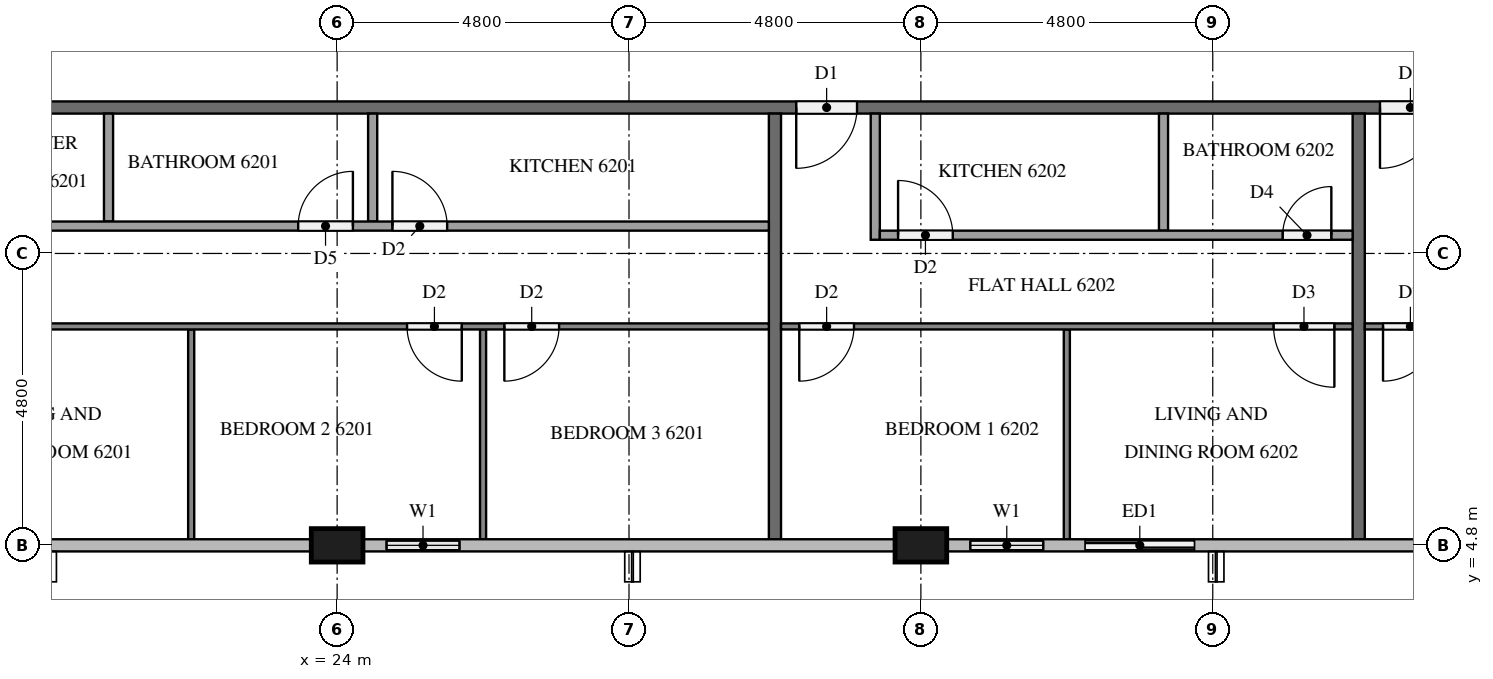
"""IFC4 building model, lengths in metres.
Left out: names, types, materials, properties, quantities, classifications, styles, units other than length and angle.
Written with IfcOpenShell. Run it as: python <this file> out.ifc"""

import sys

from ifc_helpers import new_model, si_unit, direction, frame, frame_2d, origin, origin_2d, place, context, subcontext, project, spatial, rectangle, extrude, element, fill, save


model = new_model("IFC4")
c1 = context("Model", 3, precision=1e-05, world=origin(), true_north=direction((0.0, 1.0)))
c2 = subcontext(c1, "Body", "Model", "MODEL_VIEW")
j1 = project(units=[si_unit("LENGTHUNIT", "METRE"), si_unit("PLANEANGLEUNIT", "RADIAN")], contexts=[c1])
p1 = place(None, origin())
s1 = spatial("IfcSite", under=j1, at=p1, CompositionType="ELEMENT")
p2 = place(p1, origin())
s2 = spatial("IfcBuilding", under=s1, at=p2, CompositionType="ELEMENT")
p3 = place(p2, frame((0.0, 0.0, 238.7)))
s3 = spatial("IfcBuildingStorey", under=s2, at=p3, CompositionType="ELEMENT", Elevation=238.7)
for number, where, z_axis, x_axis in (
    (1, (24.0, 4.8, 0.0), (0.0, 0.0, 1.0), (1.0, 0.0, 0.0)),
    (2, (33.6, 4.8, 0.0), (0.0, 0.0, 1.0), (1.0, 0.0, 0.0)),
):
    element("IfcColumn", number, at=place(p3, frame(where, z_axis=z_axis, x_axis=x_axis)), inside=s3, PredefinedType="COLUMN", context=c2, shape_type="SweptSolid", body=[
        extrude(rectangle(XDim=0.85, YDim=0.55, at=origin_2d()), origin(), (0.0, 0.0, 1.0), 3.2),
    ])
p4 = place(p3, frame((24.425, 4.8, 0.0), z_axis=(0.0, 0.0, 1.0), x_axis=(1.0, 0.0, 0.0)))
e3 = element("IfcWall", 3, at=p4, inside=s3, PredefinedType="SOLIDWALL", context=c2, shape_type="SweptSolid", body=[
    extrude(rectangle(XDim=1.975, YDim=0.15, at=frame_2d((0.987, 0.0))), origin(), (0.0, 0.0, 1.0), 3.2),
])
p5 = place(p4, frame((0.387, 0.0, 0.9)))
e4 = element("IfcOpeningElement", 4, at=p5, cuts=e3, PredefinedType="OPENING", context=c2, shape_type="SweptSolid", body=[
    extrude(rectangle(XDim=1.2, YDim=1.4, at=frame_2d((0.6, 0.7))), frame((0.0, 0.085, 0.0), z_axis=(0.0, -1.0, 0.0), x_axis=(1.0, 0.0, 0.0)), (0.0, 0.0, 1.0), 0.17),
])
p6 = place(p3, frame((34.025, 4.8, 0.0), z_axis=(0.0, 0.0, 1.0), x_axis=(1.0, 0.0, 0.0)))
e5 = element("IfcWall", 5, at=p6, inside=s3, PredefinedType="SOLIDWALL", context=c2, shape_type="SweptSolid", body=[
    extrude(rectangle(XDim=4.375, YDim=0.15, at=frame_2d((2.188, 0.0))), origin(), (0.0, 0.0, 1.0), 3.2),
])
p7 = place(p6, frame((0.387, 0.0, 0.9)))
e6 = element("IfcOpeningElement", 6, at=p7, cuts=e5, PredefinedType="OPENING", context=c2, shape_type="SweptSolid", body=[
    extrude(rectangle(XDim=1.2, YDim=1.4, at=frame_2d((0.6, 0.7))), frame((0.0, 0.085, 0.0), z_axis=(0.0, -1.0, 0.0), x_axis=(1.0, 0.0, 0.0)), (0.0, 0.0, 1.0), 0.17),
])
p8 = place(p6, frame((2.275, 0.0, 0.0)))
e7 = element("IfcOpeningElement", 7, at=p8, cuts=e5, PredefinedType="OPENING", context=c2, shape_type="SweptSolid", body=[
    extrude(rectangle(XDim=1.8, YDim=2.4, at=frame_2d((0.9, 1.2))), frame((0.0, 0.085, 0.0), z_axis=(0.0, -1.0, 0.0), x_axis=(1.0, 0.0, 0.0)), (0.0, 0.0, 1.0), 0.17),
])
p9 = place(p3, frame((50.5, 12.0, 0.0), z_axis=(0.0, 0.0, 1.0), x_axis=(-1.0, 0.0, 0.0)))
e8 = element("IfcWall", 8, at=p9, inside=s3, PredefinedType="PARTITIONING", context=c2, shape_type="SweptSolid", body=[
    extrude(rectangle(XDim=38.6, YDim=0.2, at=frame_2d((19.3, 0.0))), origin(), (0.0, 0.0, 1.0), 3.2),
])
p10 = place(p9, frame((37.1, 0.0, 0.0)))
e9 = element("IfcOpeningElement", 9, at=p10, cuts=e8, PredefinedType="OPENING", context=c2, shape_type="SweptSolid", body=[
    extrude(rectangle(XDim=1.1, YDim=2.1, at=frame_2d((0.55, 1.05))), frame((0.0, 0.11, 0.0), z_axis=(0.0, -1.0, 0.0), x_axis=(1.0, 0.0, 0.0)), (0.0, 0.0, 1.0), 0.22),
])
p11 = place(p9, frame((17.95, 0.0, 0.0)))
e10 = element("IfcOpeningElement", 10, at=p11, cuts=e8, PredefinedType="OPENING", context=c2, shape_type="SweptSolid", body=[
    extrude(rectangle(XDim=1.0, YDim=2.1, at=frame_2d((0.5, 1.05))), frame((0.0, 0.11, 0.0), z_axis=(0.0, -1.0, 0.0), x_axis=(1.0, 0.0, 0.0)), (0.0, 0.0, 1.0), 0.22),
])
p12 = place(p9, frame((8.35, 0.0, 0.0)))
e11 = element("IfcOpeningElement", 11, at=p12, cuts=e8, PredefinedType="OPENING", context=c2, shape_type="SweptSolid", body=[
    extrude(rectangle(XDim=1.0, YDim=2.1, at=frame_2d((0.5, 1.05))), frame((0.0, 0.11, 0.0), z_axis=(0.0, -1.0, 0.0), x_axis=(1.0, 0.0, 0.0)), (0.0, 0.0, 1.0), 0.22),
])
for number, where, z_axis, x_axis in (
    (12, (31.2, 11.9, 0.0), (0.0, 0.0, 1.0), (0.0, -1.0, 0.0)),
    (13, (40.8, 11.9, 0.0), (0.0, 0.0, 1.0), (0.0, -1.0, 0.0)),
):
    element("IfcWall", number, at=place(p3, frame(where, z_axis=z_axis, x_axis=x_axis)), inside=s3, PredefinedType="PARTITIONING", context=c2, shape_type="SweptSolid", body=[
        extrude(rectangle(XDim=7.0, YDim=0.2, at=frame_2d((3.5, 0.0))), origin(), (0.0, 0.0, 1.0), 3.2),
    ])
for number, where, z_axis, x_axis in (
    (14, (21.6, 8.35, 0.0), (0.0, 0.0, 1.0), (0.0, -1.0, 0.0)),
    (15, (26.4, 8.35, 0.0), (0.0, 0.0, 1.0), (0.0, -1.0, 0.0)),
):
    element("IfcWall", number, at=place(p3, frame(where, z_axis=z_axis, x_axis=x_axis)), inside=s3, PredefinedType="PARTITIONING", context=c2, shape_type="SweptSolid", body=[
        extrude(rectangle(XDim=3.45, YDim=0.1, at=frame_2d((1.725, 0.0))), origin(), (0.0, 0.0, 1.0), 3.2),
    ])
p13 = place(p3, frame((31.1, 8.4, 0.0), z_axis=(0.0, 0.0, 1.0), x_axis=(-1.0, 0.0, 0.0)))
e16 = element("IfcWall", 16, at=p13, inside=s3, PredefinedType="PARTITIONING", context=c2, shape_type="SweptSolid", body=[
    extrude(rectangle(XDim=19.0, YDim=0.1, at=frame_2d((9.5, 0.0))), origin(), (0.0, 0.0, 1.0), 3.2),
])
p14 = place(p13, frame((14.65, 0.0, 0.0)))
e17 = element("IfcOpeningElement", 17, at=p14, cuts=e16, PredefinedType="OPENING", context=c2, shape_type="SweptSolid", body=[
    extrude(rectangle(XDim=0.9, YDim=2.1, at=frame_2d((0.45, 1.05))), frame((0.0, 0.06, 0.0), z_axis=(0.0, -1.0, 0.0), x_axis=(1.0, 0.0, 0.0)), (0.0, 0.0, 1.0), 0.12),
])
p15 = place(p13, frame((12.95, 0.0, 0.0)))
e18 = element("IfcOpeningElement", 18, at=p15, cuts=e16, PredefinedType="OPENING", context=c2, shape_type="SweptSolid", body=[
    extrude(rectangle(XDim=1.0, YDim=2.1, at=frame_2d((0.5, 1.05))), frame((0.0, 0.06, 0.0), z_axis=(0.0, -1.0, 0.0), x_axis=(1.0, 0.0, 0.0)), (0.0, 0.0, 1.0), 0.12),
])
p16 = place(p13, frame((5.05, 0.0, 0.0)))
e19 = element("IfcOpeningElement", 19, at=p16, cuts=e16, PredefinedType="OPENING", context=c2, shape_type="SweptSolid", body=[
    extrude(rectangle(XDim=0.9, YDim=2.1, at=frame_2d((0.45, 1.05))), frame((0.0, 0.06, 0.0), z_axis=(0.0, -1.0, 0.0), x_axis=(1.0, 0.0, 0.0)), (0.0, 0.0, 1.0), 0.12),
])
p17 = place(p13, frame((3.45, 0.0, 0.0)))
e20 = element("IfcOpeningElement", 20, at=p17, cuts=e16, PredefinedType="OPENING", context=c2, shape_type="SweptSolid", body=[
    extrude(rectangle(XDim=0.9, YDim=2.1, at=frame_2d((0.45, 1.05))), frame((0.0, 0.06, 0.0), z_axis=(0.0, -1.0, 0.0), x_axis=(1.0, 0.0, 0.0)), (0.0, 0.0, 1.0), 0.12),
])
for number, where, z_axis, x_axis in (
    (21, (20.24, 11.9, 0.0), (0.0, 0.0, 1.0), (0.0, -1.0, 0.0)),
    (22, (24.584, 11.9, 0.0), (0.0, 0.0, 1.0), (0.0, -1.0, 0.0)),
):
    element("IfcWall", number, at=place(p3, frame(where, z_axis=z_axis, x_axis=x_axis)), inside=s3, PredefinedType="PARTITIONING", context=c2, shape_type="SweptSolid", body=[
        extrude(rectangle(XDim=1.775, YDim=0.15, at=frame_2d((0.887, 0.0))), origin(), (0.0, 0.0, 1.0), 3.2),
    ])
p18 = place(p3, frame((13.725, 10.05, 0.0), z_axis=(0.0, 0.0, 1.0), x_axis=(1.0, 0.0, 0.0)))
e23 = element("IfcWall", 23, at=p18, inside=s3, PredefinedType="PARTITIONING", context=c2, shape_type="SweptSolid", body=[
    extrude(rectangle(XDim=17.375, YDim=0.15, at=frame_2d((8.688, 0.0))), origin(), (0.0, 0.0, 1.0), 3.2),
])
p19 = place(p18, frame((2.133, 0.0, 0.0)))
e24 = element("IfcOpeningElement", 24, at=p19, cuts=e23, PredefinedType="OPENING", context=c2, shape_type="SweptSolid", body=[
    extrude(rectangle(XDim=0.8, YDim=2.1, at=frame_2d((0.4, 1.05))), frame((0.0, 0.085, 0.0), z_axis=(0.0, -1.0, 0.0), x_axis=(1.0, 0.0, 0.0)), (0.0, 0.0, 1.0), 0.17),
])
p20 = place(p18, frame((3.583, 0.0, 0.0)))
e25 = element("IfcOpeningElement", 25, at=p20, cuts=e23, PredefinedType="OPENING", context=c2, shape_type="SweptSolid", body=[
    extrude(rectangle(XDim=0.8, YDim=2.1, at=frame_2d((0.4, 1.05))), frame((0.0, 0.085, 0.0), z_axis=(0.0, -1.0, 0.0), x_axis=(1.0, 0.0, 0.0)), (0.0, 0.0, 1.0), 0.17),
])
p21 = place(p18, frame((9.635, 0.0, 0.0)))
e26 = element("IfcOpeningElement", 26, at=p21, cuts=e23, PredefinedType="OPENING", context=c2, shape_type="SweptSolid", body=[
    extrude(rectangle(XDim=0.9, YDim=2.1, at=frame_2d((0.45, 1.05))), frame((0.0, 0.085, 0.0), z_axis=(0.0, -1.0, 0.0), x_axis=(1.0, 0.0, 0.0)), (0.0, 0.0, 1.0), 0.17),
])
p22 = place(p18, frame((11.184, 0.0, 0.0)))
e27 = element("IfcOpeningElement", 27, at=p22, cuts=e23, PredefinedType="OPENING", context=c2, shape_type="SweptSolid", body=[
    extrude(rectangle(XDim=0.9, YDim=2.1, at=frame_2d((0.45, 1.05))), frame((0.0, 0.085, 0.0), z_axis=(0.0, -1.0, 0.0), x_axis=(1.0, 0.0, 0.0)), (0.0, 0.0, 1.0), 0.17),
])
p23 = place(p3, frame((36.0, 8.35, 0.0), z_axis=(0.0, 0.0, 1.0), x_axis=(0.0, -1.0, 0.0)))
e28 = element("IfcWall", 28, at=p23, inside=s3, PredefinedType="PARTITIONING", context=c2, shape_type="SweptSolid", body=[
    extrude(rectangle(XDim=3.45, YDim=0.1, at=frame_2d((1.725, 0.0))), origin(), (0.0, 0.0, 1.0), 3.2),
])
p24 = place(p3, frame((40.7, 8.4, 0.0), z_axis=(0.0, 0.0, 1.0), x_axis=(-1.0, 0.0, 0.0)))
e29 = element("IfcWall", 29, at=p24, inside=s3, PredefinedType="PARTITIONING", context=c2, shape_type="SweptSolid", body=[
    extrude(rectangle(XDim=9.4, YDim=0.1, at=frame_2d((4.7, 0.0))), origin(), (0.0, 0.0, 1.0), 3.2),
])
p25 = place(p24, frame((8.2, 0.0, 0.0)))
e30 = element("IfcOpeningElement", 30, at=p25, cuts=e29, PredefinedType="OPENING", context=c2, shape_type="SweptSolid", body=[
    extrude(rectangle(XDim=0.9, YDim=2.1, at=frame_2d((0.45, 1.05))), frame((0.0, 0.06, 0.0), z_axis=(0.0, -1.0, 0.0), x_axis=(1.0, 0.0, 0.0)), (0.0, 0.0, 1.0), 0.12),
])
p26 = place(p24, frame((0.3, 0.0, 0.0)))
e31 = element("IfcOpeningElement", 31, at=p26, cuts=e29, PredefinedType="OPENING", context=c2, shape_type="SweptSolid", body=[
    extrude(rectangle(XDim=1.0, YDim=2.1, at=frame_2d((0.5, 1.05))), frame((0.0, 0.06, 0.0), z_axis=(0.0, -1.0, 0.0), x_axis=(1.0, 0.0, 0.0)), (0.0, 0.0, 1.0), 0.12),
])
p27 = place(p3, frame((37.59, 11.9, 0.0), z_axis=(0.0, 0.0, 1.0), x_axis=(0.0, -1.0, 0.0)))
e32 = element("IfcWall", 32, at=p27, inside=s3, PredefinedType="PARTITIONING", context=c2, shape_type="SweptSolid", body=[
    extrude(rectangle(XDim=1.925, YDim=0.15, at=frame_2d((0.962, 0.0))), origin(), (0.0, 0.0, 1.0), 3.2),
])
p28 = place(p3, frame((32.85, 11.9, 0.0), z_axis=(0.0, 0.0, 1.0), x_axis=(0.0, -1.0, 0.0)))
e33 = element("IfcWall", 33, at=p28, inside=s3, PredefinedType="PARTITIONING", context=c2, shape_type="SweptSolid", body=[
    extrude(rectangle(XDim=2.075, YDim=0.15, at=frame_2d((1.038, 0.0))), origin(), (0.0, 0.0, 1.0), 3.2),
])
p29 = place(p3, frame((32.925, 9.9, 0.0), z_axis=(0.0, 0.0, 1.0), x_axis=(1.0, 0.0, 0.0)))
e34 = element("IfcWall", 34, at=p29, inside=s3, PredefinedType="PARTITIONING", context=c2, shape_type="SweptSolid", body=[
    extrude(rectangle(XDim=7.775, YDim=0.15, at=frame_2d((3.887, 0.0))), origin(), (0.0, 0.0, 1.0), 3.2),
])
p30 = place(p29, frame((0.3, 0.0, 0.0)))
e35 = element("IfcOpeningElement", 35, at=p30, cuts=e34, PredefinedType="OPENING", context=c2, shape_type="SweptSolid", body=[
    extrude(rectangle(XDim=0.9, YDim=2.1, at=frame_2d((0.45, 1.05))), frame((0.0, 0.085, 0.0), z_axis=(0.0, -1.0, 0.0), x_axis=(1.0, 0.0, 0.0)), (0.0, 0.0, 1.0), 0.17),
])
p31 = place(p29, frame((6.625, 0.0, 0.0)))
e36 = element("IfcOpeningElement", 36, at=p31, cuts=e34, PredefinedType="OPENING", context=c2, shape_type="SweptSolid", body=[
    extrude(rectangle(XDim=0.8, YDim=2.1, at=frame_2d((0.4, 1.05))), frame((0.0, 0.085, 0.0), z_axis=(0.0, -1.0, 0.0), x_axis=(1.0, 0.0, 0.0)), (0.0, 0.0, 1.0), 0.17),
])
p32 = place(p3, frame((57.178, 8.4, 0.0), z_axis=(0.0, 0.0, 1.0), x_axis=(-1.0, 0.0, 0.0)))
e37 = element("IfcWall", 37, at=p32, inside=s3, PredefinedType="PARTITIONING", context=c2, shape_type="SweptSolid", body=[
    extrude(rectangle(XDim=16.279, YDim=0.1, at=frame_2d((8.139, 0.0))), origin(), (0.0, 0.0, 1.0), 3.2),
])
p33 = place(p32, frame((15.079, 0.0, 0.0)))
e38 = element("IfcOpeningElement", 38, at=p33, cuts=e37, PredefinedType="OPENING", context=c2, shape_type="SweptSolid", body=[
    extrude(rectangle(XDim=0.9, YDim=2.1, at=frame_2d((0.45, 1.05))), frame((0.0, 0.06, 0.0), z_axis=(0.0, -1.0, 0.0), x_axis=(1.0, 0.0, 0.0)), (0.0, 0.0, 1.0), 0.12),
])
p34 = place(p32, frame((7.128, 0.0, 0.0)))
e39 = element("IfcOpeningElement", 39, at=p34, cuts=e37, PredefinedType="OPENING", context=c2, shape_type="SweptSolid", body=[
    extrude(rectangle(XDim=0.9, YDim=2.1, at=frame_2d((0.45, 1.05))), frame((0.0, 0.06, 0.0), z_axis=(0.0, -1.0, 0.0), x_axis=(1.0, 0.0, 0.0)), (0.0, 0.0, 1.0), 0.12),
])
p35 = place(p32, frame((5.428, 0.0, 0.0)))
e40 = element("IfcOpeningElement", 40, at=p35, cuts=e37, PredefinedType="OPENING", context=c2, shape_type="SweptSolid", body=[
    extrude(rectangle(XDim=1.0, YDim=2.1, at=frame_2d((0.5, 1.05))), frame((0.0, 0.06, 0.0), z_axis=(0.0, -1.0, 0.0), x_axis=(1.0, 0.0, 0.0)), (0.0, 0.0, 1.0), 0.12),
])
p36 = place(p5, origin())
e41 = element("IfcWindow", 41, at=p36, inside=s3, PartitioningType="SINGLE_PANEL", PredefinedType="WINDOW", context=c2, shape_type="SweptSolid", body=[
    extrude(rectangle(XDim=1.2, YDim=1.4, at=frame_2d((0.6, 0.7))), frame((0.0, 0.03, 0.0), z_axis=(0.0, -1.0, 0.0), x_axis=(1.0, 0.0, 0.0)), (0.0, 0.0, 1.0), 0.06),
])
fill(e4, e41)
p37 = place(p7, origin())
e42 = element("IfcWindow", 42, at=p37, inside=s3, PartitioningType="SINGLE_PANEL", PredefinedType="WINDOW", context=c2, shape_type="SweptSolid", body=[
    extrude(rectangle(XDim=1.2, YDim=1.4, at=frame_2d((0.6, 0.7))), frame((0.0, 0.03, 0.0), z_axis=(0.0, -1.0, 0.0), x_axis=(1.0, 0.0, 0.0)), (0.0, 0.0, 1.0), 0.06),
])
fill(e6, e42)
p38 = place(p8, origin())
e43 = element("IfcDoor", 43, at=p38, inside=s3, OperationType="SLIDING_TO_RIGHT", PredefinedType="DOOR", context=c2, shape_type="SweptSolid", body=[
    extrude(rectangle(XDim=1.8, YDim=2.4, at=frame_2d((0.9, 1.2))), frame((0.0, 0.025, 0.0), z_axis=(0.0, -1.0, 0.0), x_axis=(1.0, 0.0, 0.0)), (0.0, 0.0, 1.0), 0.05),
])
fill(e7, e43)
p39 = place(p11, origin())
e44 = element("IfcDoor", 44, at=p39, inside=s3, OperationType="SINGLE_SWING_RIGHT", PredefinedType="DOOR", context=c2, shape_type="SweptSolid", body=[
    extrude(rectangle(XDim=1.0, YDim=2.1, at=frame_2d((0.5, 1.05))), frame((0.0, 0.025, 0.0), z_axis=(0.0, -1.0, 0.0), x_axis=(1.0, 0.0, 0.0)), (0.0, 0.0, 1.0), 0.05),
])
fill(e10, e44)
p40 = place(p12, origin())
e45 = element("IfcDoor", 45, at=p40, inside=s3, OperationType="SINGLE_SWING_RIGHT", PredefinedType="DOOR", context=c2, shape_type="SweptSolid", body=[
    extrude(rectangle(XDim=1.0, YDim=2.1, at=frame_2d((0.5, 1.05))), frame((0.0, 0.025, 0.0), z_axis=(0.0, -1.0, 0.0), x_axis=(1.0, 0.0, 0.0)), (0.0, 0.0, 1.0), 0.05),
])
fill(e11, e45)
p41 = place(p16, origin())
e46 = element("IfcDoor", 46, at=p41, inside=s3, OperationType="SINGLE_SWING_LEFT", PredefinedType="DOOR", context=c2, shape_type="SweptSolid", body=[
    extrude(rectangle(XDim=0.9, YDim=2.1, at=frame_2d((0.45, 1.05))), frame((0.0, 0.025, 0.0), z_axis=(0.0, -1.0, 0.0), x_axis=(1.0, 0.0, 0.0)), (0.0, 0.0, 1.0), 0.05),
])
fill(e19, e46)
p42 = place(p17, origin())
e47 = element("IfcDoor", 47, at=p42, inside=s3, OperationType="SINGLE_SWING_RIGHT", PredefinedType="DOOR", context=c2, shape_type="SweptSolid", body=[
    extrude(rectangle(XDim=0.9, YDim=2.1, at=frame_2d((0.45, 1.05))), frame((0.0, 0.025, 0.0), z_axis=(0.0, -1.0, 0.0), x_axis=(1.0, 0.0, 0.0)), (0.0, 0.0, 1.0), 0.05),
])
fill(e20, e47)
p43 = place(p21, origin())
e48 = element("IfcDoor", 48, at=p43, inside=s3, OperationType="SINGLE_SWING_RIGHT", PredefinedType="DOOR", context=c2, shape_type="SweptSolid", body=[
    extrude(rectangle(XDim=0.9, YDim=2.1, at=frame_2d((0.45, 1.05))), frame((0.0, 0.025, 0.0), z_axis=(0.0, -1.0, 0.0), x_axis=(1.0, 0.0, 0.0)), (0.0, 0.0, 1.0), 0.05),
])
fill(e26, e48)
p44 = place(p22, origin())
e49 = element("IfcDoor", 49, at=p44, inside=s3, OperationType="SINGLE_SWING_LEFT", PredefinedType="DOOR", context=c2, shape_type="SweptSolid", body=[
    extrude(rectangle(XDim=0.9, YDim=2.1, at=frame_2d((0.45, 1.05))), frame((0.0, 0.025, 0.0), z_axis=(0.0, -1.0, 0.0), x_axis=(1.0, 0.0, 0.0)), (0.0, 0.0, 1.0), 0.05),
])
fill(e27, e49)
p45 = place(p25, origin())
e50 = element("IfcDoor", 50, at=p45, inside=s3, OperationType="SINGLE_SWING_RIGHT", PredefinedType="DOOR", context=c2, shape_type="SweptSolid", body=[
    extrude(rectangle(XDim=0.9, YDim=2.1, at=frame_2d((0.45, 1.05))), frame((0.0, 0.025, 0.0), z_axis=(0.0, -1.0, 0.0), x_axis=(1.0, 0.0, 0.0)), (0.0, 0.0, 1.0), 0.05),
])
fill(e30, e50)
p46 = place(p26, origin())
e51 = element("IfcDoor", 51, at=p46, inside=s3, OperationType="SINGLE_SWING_LEFT", PredefinedType="DOOR", context=c2, shape_type="SweptSolid", body=[
    extrude(rectangle(XDim=1.0, YDim=2.1, at=frame_2d((0.5, 1.05))), frame((0.0, 0.025, 0.0), z_axis=(0.0, -1.0, 0.0), x_axis=(1.0, 0.0, 0.0)), (0.0, 0.0, 1.0), 0.05),
])
fill(e31, e51)
p47 = place(p30, origin())
e52 = element("IfcDoor", 52, at=p47, inside=s3, OperationType="SINGLE_SWING_LEFT", PredefinedType="DOOR", context=c2, shape_type="SweptSolid", body=[
    extrude(rectangle(XDim=0.9, YDim=2.1, at=frame_2d((0.45, 1.05))), frame((0.0, 0.025, 0.0), z_axis=(0.0, -1.0, 0.0), x_axis=(1.0, 0.0, 0.0)), (0.0, 0.0, 1.0), 0.05),
])
fill(e35, e52)
p48 = place(p31, origin())
e53 = element("IfcDoor", 53, at=p48, inside=s3, OperationType="SINGLE_SWING_RIGHT", PredefinedType="DOOR", context=c2, shape_type="SweptSolid", body=[
    extrude(rectangle(XDim=0.8, YDim=2.1, at=frame_2d((0.4, 1.05))), frame((0.0, 0.025, 0.0), z_axis=(0.0, -1.0, 0.0), x_axis=(1.0, 0.0, 0.0)), (0.0, 0.0, 1.0), 0.05),
])
fill(e36, e53)
p49 = place(p33, origin())
e54 = element("IfcDoor", 54, at=p49, inside=s3, OperationType="SINGLE_SWING_RIGHT", PredefinedType="DOOR", context=c2, shape_type="SweptSolid", body=[
    extrude(rectangle(XDim=0.9, YDim=2.1, at=frame_2d((0.45, 1.05))), frame((0.0, 0.025, 0.0), z_axis=(0.0, -1.0, 0.0), x_axis=(1.0, 0.0, 0.0)), (0.0, 0.0, 1.0), 0.05),
])
fill(e38, e54)
save(model, sys.argv[1])
